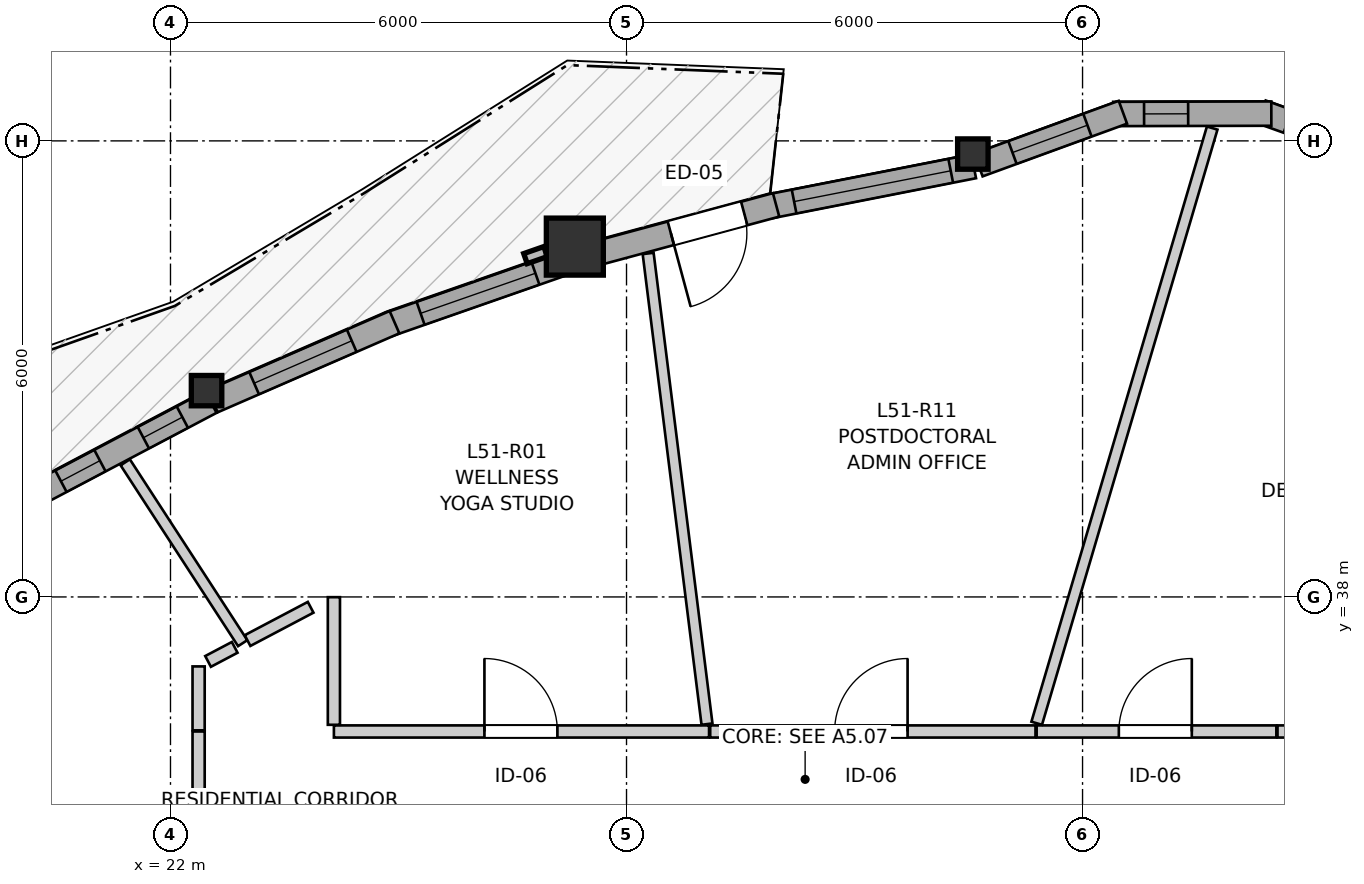
"""IFC4 building model, lengths in metres.
Left out: names, types, materials, properties, quantities, classifications, styles, units other than length and angle.
Written with IfcOpenShell. Run it as: python <this file> out.ifc"""

import sys

from ifc_helpers import new_model, si_unit, direction, frame, frame_2d, origin, origin_2d, place, context, subcontext, project, spatial, rectangle, i_section, extrude, source, transform, mapped, element, fill, save


model = new_model("IFC4")
c1 = context("Model", 3, precision=1e-05, world=origin(), true_north=direction((0.0, 1.0)))
c2 = subcontext(c1, "Body", "Model", "MODEL_VIEW")
j1 = project(units=[si_unit("LENGTHUNIT", "METRE"), si_unit("PLANEANGLEUNIT", "RADIAN")], contexts=[c1])
p1 = place(None, origin())
s1 = spatial("IfcSite", under=j1, at=p1, CompositionType="ELEMENT")
p2 = place(p1, origin())
s2 = spatial("IfcBuilding", under=s1, at=p2, CompositionType="ELEMENT")
p3 = place(p2, frame((0.0, 0.0, 171.4)))
s3 = spatial("IfcBuildingStorey", under=s2, at=p3, CompositionType="ELEMENT", Elevation=171.4)
m1 = source(origin(), c2, "Body", "SweptSolid", [
    extrude(i_section(OverallWidth=0.401, OverallDepth=0.399, WebThickness=0.023, FlangeThickness=0.036, FilletRadius=0.015, at=origin_2d()), origin(), (0.0, 0.0, 1.0), 2.95),
])
p4 = place(p3, frame((32.557, 43.827, 0.0), z_axis=(0.0, 0.0, 1.0), x_axis=(1.0, 0.0, 0.0)))
e1 = element("IfcColumn", 1, at=p4, inside=s3, PredefinedType="PILASTER", context=c2, shape_type="MappedRepresentation", body=[
    mapped(m1, transform((0.0, 0.0, 0.0), x_axis=(1.0, 0.0, 0.0), y_axis=(0.0, 1.0, 0.0), z_axis=(0.0, 0.0, 1.0), scale=1.0)),
])
m2 = source(origin(), c2, "Body", "SweptSolid", [
    extrude(rectangle(XDim=0.75, YDim=0.75, at=origin_2d()), origin(), (0.0, 0.0, 1.0), 2.95),
])
p5 = place(p3, frame((27.32, 42.609, 0.0), z_axis=(0.0, 0.0, 1.0), x_axis=(1.0, 0.0, 0.0)))
e2 = element("IfcColumn", 2, at=p5, inside=s3, PredefinedType="COLUMN", context=c2, shape_type="MappedRepresentation", body=[
    mapped(m2, transform((0.0, 0.0, 0.0), x_axis=(1.0, 0.0, 0.0), y_axis=(0.0, 1.0, 0.0), z_axis=(0.0, 0.0, 1.0), scale=1.0)),
])
p6 = place(p3, frame((22.475, 40.714, 0.0), z_axis=(0.0, 0.0, 1.0), x_axis=(1.0, 0.0, 0.0)))
e3 = element("IfcColumn", 3, at=p6, inside=s3, PredefinedType="PILASTER", context=c2, shape_type="MappedRepresentation", body=[
    mapped(m1, transform((0.0, 0.0, 0.0), x_axis=(1.0, 0.0, 0.0), y_axis=(0.0, 1.0, 0.0), z_axis=(0.0, 0.0, 1.0), scale=1.0)),
])
p7 = place(p3, frame((38.314, 43.677, 0.0), z_axis=(0.0, 0.0, 1.0), x_axis=(-0.941071215914, 0.338208466153, 0.0)))
e4 = element("IfcWall", 4, at=p7, inside=s3, PredefinedType="SOLIDWALL", context=c2, shape_type="SweptSolid", body=[
    extrude(rectangle(XDim=2.081, YDim=0.32, at=frame_2d((1.041, 0.0))), origin(), (0.0, 0.0, 1.0), 2.53),
])
p8 = place(p7, frame((0.365, 0.0, 0.82)))
e5 = element("IfcOpeningElement", 5, at=p8, cuts=e4, PredefinedType="OPENING", context=c2, shape_type="SweptSolid", body=[
    extrude(rectangle(XDim=1.35, YDim=1.45, at=frame_2d((0.675, 0.725))), frame((0.0, 0.17, 0.0), z_axis=(0.0, -1.0, 0.0), x_axis=(1.0, 0.0, 0.0)), (0.0, 0.0, 1.0), 0.34),
])
p9 = place(p3, frame((36.484, 44.359, 0.0), z_axis=(0.0, 0.0, 1.0), x_axis=(-0.999997248057, -0.0023460346, 0.0)))
e6 = element("IfcWall", 6, at=p9, inside=s3, PredefinedType="SOLIDWALL", context=c2, shape_type="SweptSolid", body=[
    extrude(rectangle(XDim=2.081, YDim=0.32, at=frame_2d((1.041, 0.0))), origin(), (0.0, 0.0, 1.0), 2.53),
])
p10 = place(p9, frame((1.094, 0.0, 0.82)))
e7 = element("IfcOpeningElement", 7, at=p10, cuts=e6, PredefinedType="OPENING", context=c2, shape_type="SweptSolid", body=[
    extrude(rectangle(XDim=0.58, YDim=1.35, at=frame_2d((0.29, 0.675))), frame((0.0, 0.17, 0.0), z_axis=(0.0, -1.0, 0.0), x_axis=(1.0, 0.0, 0.0)), (0.0, 0.0, 1.0), 0.34),
])
p11 = place(p3, frame((34.531, 44.377, 0.0), z_axis=(0.0, 0.0, 1.0), x_axis=(-0.939387553708, -0.342857148007, 0.0)))
e8 = element("IfcWall", 8, at=p11, inside=s3, PredefinedType="SOLIDWALL", context=c2, shape_type="SweptSolid", body=[
    extrude(rectangle(XDim=2.023, YDim=0.32, at=frame_2d((1.011, 0.0))), origin(), (0.0, 0.0, 1.0), 2.53),
])
p12 = place(p11, frame((0.497, 0.0, 0.82)))
e9 = element("IfcOpeningElement", 9, at=p12, cuts=e8, PredefinedType="OPENING", context=c2, shape_type="SweptSolid", body=[
    extrude(rectangle(XDim=1.05, YDim=1.45, at=frame_2d((0.525, 0.725))), frame((0.0, 0.17, 0.0), z_axis=(0.0, -1.0, 0.0), x_axis=(1.0, 0.0, 0.0)), (0.0, 0.0, 1.0), 0.34),
])
p13 = place(p3, frame((32.568, 43.666, 0.0), z_axis=(0.0, 0.0, 1.0), x_axis=(-0.98123405142, -0.192820476959, 0.0)))
e10 = element("IfcWall", 10, at=p13, inside=s3, PredefinedType="SOLIDWALL", context=c2, shape_type="SweptSolid", body=[
    extrude(rectangle(XDim=2.736, YDim=0.32, at=frame_2d((1.368, 0.0))), origin(), (0.0, 0.0, 1.0), 2.53),
])
p14 = place(p13, frame((0.308, 0.0, 0.82)))
e11 = element("IfcOpeningElement", 11, at=p14, cuts=e10, PredefinedType="OPENING", context=c2, shape_type="SweptSolid", body=[
    extrude(rectangle(XDim=2.1, YDim=1.4, at=frame_2d((1.05, 0.7))), frame((0.0, 0.17, 0.0), z_axis=(0.0, -1.0, 0.0), x_axis=(1.0, 0.0, 0.0)), (0.0, 0.0, 1.0), 0.34),
])
p15 = place(p3, frame((29.968, 43.158, 0.0), z_axis=(0.0, 0.0, 1.0), x_axis=(-0.965458407369, -0.260557217593, 0.0)))
e12 = element("IfcWall", 12, at=p15, inside=s3, PredefinedType="SOLIDWALL", context=c2, shape_type="SweptSolid", body=[
    extrude(rectangle(XDim=2.535, YDim=0.32, at=frame_2d((1.267, 0.0))), origin(), (0.0, 0.0, 1.0), 2.53),
])
p16 = place(p15, frame((0.434, 0.0, 0.0)))
e13 = element("IfcOpeningElement", 13, at=p16, cuts=e12, PredefinedType="OPENING", context=c2, shape_type="SweptSolid", body=[
    extrude(rectangle(XDim=1.0, YDim=2.1, at=frame_2d((0.5, 1.05))), frame((0.0, 0.17, 0.0), z_axis=(0.0, -1.0, 0.0), x_axis=(1.0, 0.0, 0.0)), (0.0, 0.0, 1.0), 0.34),
])
p17 = place(p3, frame((27.217, 42.404, 0.0), z_axis=(0.0, 0.0, 1.0), x_axis=(-0.94410869631, -0.329634296687, 0.0)))
e14 = element("IfcWall", 14, at=p17, inside=s3, PredefinedType="SOLIDWALL", context=c2, shape_type="SweptSolid", body=[
    extrude(rectangle(XDim=2.491, YDim=0.32, at=frame_2d((1.245, 0.0))), origin(), (0.0, 0.0, 1.0), 2.53),
])
p18 = place(p17, frame((0.44, 0.0, 0.82)))
e15 = element("IfcOpeningElement", 15, at=p18, cuts=e14, PredefinedType="OPENING", context=c2, shape_type="SweptSolid", body=[
    extrude(rectangle(XDim=1.6, YDim=1.35, at=frame_2d((0.8, 0.675))), frame((0.0, 0.17, 0.0), z_axis=(0.0, -1.0, 0.0), x_axis=(1.0, 0.0, 0.0)), (0.0, 0.0, 1.0), 0.34),
])
p19 = place(p3, frame((24.947, 41.615, 0.0), z_axis=(0.0, 0.0, 1.0), x_axis=(-0.9171028146, -0.398650758752, 0.0)))
e16 = element("IfcWall", 16, at=p19, inside=s3, PredefinedType="SOLIDWALL", context=c2, shape_type="SweptSolid", body=[
    extrude(rectangle(XDim=2.606, YDim=0.32, at=frame_2d((1.303, 0.0))), origin(), (0.0, 0.0, 1.0), 2.53),
])
p20 = place(p19, frame((0.613, 0.0, 0.82)))
e17 = element("IfcOpeningElement", 17, at=p20, cuts=e16, PredefinedType="OPENING", context=c2, shape_type="SweptSolid", body=[
    extrude(rectangle(XDim=1.4, YDim=1.35, at=frame_2d((0.7, 0.675))), frame((0.0, 0.17, 0.0), z_axis=(0.0, -1.0, 0.0), x_axis=(1.0, 0.0, 0.0)), (0.0, 0.0, 1.0), 0.34),
])
p21 = place(p3, frame((22.531, 40.563, 0.0), z_axis=(0.0, 0.0, 1.0), x_axis=(-0.884376111278, -0.466774992691, 0.0)))
e18 = element("IfcWall", 18, at=p21, inside=s3, PredefinedType="SOLIDWALL", context=c2, shape_type="SweptSolid", body=[
    extrude(rectangle(XDim=2.592, YDim=0.32, at=frame_2d((1.296, 0.0))), origin(), (0.0, 0.0, 1.0), 2.53),
])
p22 = place(p21, frame((0.424, 0.0, 0.82)))
e19 = element("IfcOpeningElement", 19, at=p22, cuts=e18, PredefinedType="OPENING", context=c2, shape_type="SweptSolid", body=[
    extrude(rectangle(XDim=0.58, YDim=1.35, at=frame_2d((0.29, 0.675))), frame((0.0, 0.17, 0.0), z_axis=(0.0, -1.0, 0.0), x_axis=(1.0, 0.0, 0.0)), (0.0, 0.0, 1.0), 0.34),
])
p23 = place(p21, frame((1.65, 0.0, 0.82)))
e20 = element("IfcOpeningElement", 20, at=p23, cuts=e18, PredefinedType="OPENING", context=c2, shape_type="SweptSolid", body=[
    extrude(rectangle(XDim=0.58, YDim=1.35, at=frame_2d((0.29, 0.675))), frame((0.0, 0.17, 0.0), z_axis=(0.0, -1.0, 0.0), x_axis=(1.0, 0.0, 0.0)), (0.0, 0.0, 1.0), 0.34),
])
p24 = place(p3, frame((24.15, 36.23, 0.0), z_axis=(0.0, 0.0, 1.0), x_axis=(1.0, 0.0, 0.0)))
e21 = element("IfcWall", 21, at=p24, inside=s3, PredefinedType="PARTITIONING", context=c2, shape_type="SweptSolid", body=[
    extrude(rectangle(XDim=4.936, YDim=0.16, at=frame_2d((2.468, 0.0))), origin(), (0.0, 0.0, 1.0), 2.95),
])
p25 = place(p24, frame((1.98, 0.0, 0.0)))
e22 = element("IfcOpeningElement", 22, at=p25, cuts=e21, PredefinedType="OPENING", context=c2, shape_type="SweptSolid", body=[
    extrude(rectangle(XDim=0.96, YDim=2.1, at=frame_2d((0.48, 1.05))), frame((0.0, 0.09, 0.0), z_axis=(0.0, -1.0, 0.0), x_axis=(1.0, 0.0, 0.0)), (0.0, 0.0, 1.0), 0.18),
])
p26 = place(p3, frame((29.101, 36.23, 0.0), z_axis=(0.0, 0.0, 1.0), x_axis=(1.0, 0.0, 0.0)))
e23 = element("IfcWall", 23, at=p26, inside=s3, PredefinedType="PARTITIONING", context=c2, shape_type="SweptSolid", body=[
    extrude(rectangle(XDim=4.28, YDim=0.16, at=frame_2d((2.14, 0.0))), origin(), (0.0, 0.0, 1.0), 2.588),
])
p27 = place(p26, frame((1.637, 0.0, 0.0)))
e24 = element("IfcOpeningElement", 24, at=p27, cuts=e23, PredefinedType="OPENING", context=c2, shape_type="SweptSolid", body=[
    extrude(rectangle(XDim=0.96, YDim=2.1, at=frame_2d((0.48, 1.05))), frame((0.0, 0.09, 0.0), z_axis=(0.0, -1.0, 0.0), x_axis=(1.0, 0.0, 0.0)), (0.0, 0.0, 1.0), 0.18),
])
p28 = place(p3, frame((33.396, 36.23, 0.0), z_axis=(0.0, 0.0, 1.0), x_axis=(1.0, 0.0, 0.0)))
e25 = element("IfcWall", 25, at=p28, inside=s3, PredefinedType="PARTITIONING", context=c2, shape_type="SweptSolid", body=[
    extrude(rectangle(XDim=3.154, YDim=0.16, at=frame_2d((1.577, 0.0))), origin(), (0.0, 0.0, 1.0), 2.588),
])
p29 = place(p28, frame((1.082, 0.0, 0.0)))
e26 = element("IfcOpeningElement", 26, at=p29, cuts=e25, PredefinedType="OPENING", context=c2, shape_type="SweptSolid", body=[
    extrude(rectangle(XDim=0.96, YDim=2.1, at=frame_2d((0.48, 1.05))), frame((0.0, 0.09, 0.0), z_axis=(0.0, -1.0, 0.0), x_axis=(1.0, 0.0, 0.0)), (0.0, 0.0, 1.0), 0.18),
])
p30 = place(p3, frame((33.397, 36.338, 0.0), z_axis=(0.0, 0.0, 1.0), x_axis=(0.282812266721, 0.9591752821, 0.0)))
e27 = element("IfcWall", 27, at=p30, inside=s3, PredefinedType="PARTITIONING", context=c2, shape_type="SweptSolid", body=[
    extrude(rectangle(XDim=8.164, YDim=0.145, at=frame_2d((4.082, 0.0))), origin(), (0.0, 0.0, 1.0), 2.95),
])
p31 = place(p3, frame((28.284, 42.519, 0.0), z_axis=(0.0, 0.0, 1.0), x_axis=(0.124092513413, -0.992270652652, 0.0)))
e28 = element("IfcWall", 28, at=p31, inside=s3, PredefinedType="PARTITIONING", context=c2, shape_type="SweptSolid", body=[
    extrude(rectangle(XDim=6.241, YDim=0.145, at=frame_2d((3.12, 0.0))), origin(), (0.0, 0.0, 1.0), 2.95),
])
p32 = place(p3, frame((21.405, 39.771, 0.0), z_axis=(0.0, 0.0, 1.0), x_axis=(0.544731217197, -0.838610696933, 0.0)))
e29 = element("IfcWall", 29, at=p32, inside=s3, PredefinedType="PARTITIONING", context=c2, shape_type="SweptSolid", body=[
    extrude(rectangle(XDim=2.837, YDim=0.145, at=frame_2d((1.418, 0.0))), origin(), (0.0, 0.0, 1.0), 2.95),
])
p33 = place(p3, frame((24.15, 36.318, 0.0), z_axis=(0.0, 0.0, 1.0), x_axis=(0.0, 1.0, 0.0)))
e30 = element("IfcWall", 30, at=p33, inside=s3, PredefinedType="PARTITIONING", context=c2, shape_type="SweptSolid", body=[
    extrude(rectangle(XDim=1.679, YDim=0.16, at=frame_2d((0.839, 0.0))), origin(), (0.0, 0.0, 1.0), 2.95),
])
p34 = place(p3, frame((36.565, 36.23, 0.0), z_axis=(0.0, 0.0, 1.0), x_axis=(1.0, 0.0, 0.0)))
e31 = element("IfcWall", 31, at=p34, inside=s3, PredefinedType="PARTITIONING", context=c2, shape_type="SweptSolid", body=[
    extrude(rectangle(XDim=1.677, YDim=0.16, at=frame_2d((0.838, 0.0))), origin(), (0.0, 0.0, 1.0), 2.95),
])
p35 = place(p3, frame((22.37, 34.465, 0.0), z_axis=(0.0, 0.0, 1.0), x_axis=(0.0, 1.0, 0.0)))
e32 = element("IfcWall", 32, at=p35, inside=s3, PredefinedType="PARTITIONING", context=c2, shape_type="SweptSolid", body=[
    extrude(rectangle(XDim=1.765, YDim=0.16, at=frame_2d((0.882, 0.0))), origin(), (0.0, 0.0, 1.0), 2.95),
])
p36 = place(p3, frame((23.014, 37.426, 0.0), z_axis=(0.0, 0.0, 1.0), x_axis=(0.884432472224, 0.466668192697, 0.0)))
e33 = element("IfcWall", 33, at=p36, inside=s3, PredefinedType="PARTITIONING", context=c2, shape_type="SweptSolid", body=[
    extrude(rectangle(XDim=0.938, YDim=0.16, at=frame_2d((0.469, 0.0))), origin(), (0.0, 0.0, 1.0), 2.558),
])
p37 = place(p3, frame((22.37, 36.245, 0.0), z_axis=(0.0, 0.0, 1.0), x_axis=(0.0, 1.0, 0.0)))
e34 = element("IfcWall", 34, at=p37, inside=s3, PredefinedType="PARTITIONING", context=c2, shape_type="SweptSolid", body=[
    extrude(rectangle(XDim=0.841, YDim=0.16, at=frame_2d((0.42, 0.0))), origin(), (0.0, 0.0, 1.0), 2.95),
])
p38 = place(p3, frame((22.494, 37.152, 0.0), z_axis=(0.0, 0.0, 1.0), x_axis=(0.884356504768, 0.466812138311, 0.0)))
e35 = element("IfcWall", 35, at=p38, inside=s3, PredefinedType="PARTITIONING", context=c2, shape_type="SweptSolid", body=[
    extrude(rectangle(XDim=0.396, YDim=0.16, at=frame_2d((0.198, 0.0))), origin(), (0.0, 0.0, 1.0), 2.558),
])
m3 = source(origin(), c2, "Body", "SweptSolid", [
    extrude(rectangle(XDim=0.58, YDim=1.35, at=frame_2d((0.29, 0.675))), frame((0.0, 0.03, 0.0), z_axis=(0.0, -1.0, 0.0), x_axis=(1.0, 0.0, 0.0)), (0.0, 0.0, 1.0), 0.06),
])
p39 = place(p10, origin())
e36 = element("IfcWindow", 36, at=p39, inside=s3, PartitioningType="SINGLE_PANEL", PredefinedType="WINDOW", context=c2, shape_type="MappedRepresentation", body=[
    mapped(m3, transform((0.0, 0.0, 0.0), x_axis=(1.0, 0.0, 0.0), y_axis=(0.0, 1.0, 0.0), z_axis=(0.0, 0.0, 1.0), scale=1.0)),
])
fill(e7, e36)
m4 = source(origin(), c2, "Body", "SweptSolid", [
    extrude(rectangle(XDim=1.05, YDim=1.45, at=frame_2d((0.525, 0.725))), frame((0.0, 0.03, 0.0), z_axis=(0.0, -1.0, 0.0), x_axis=(1.0, 0.0, 0.0)), (0.0, 0.0, 1.0), 0.06),
])
p40 = place(p12, origin())
e37 = element("IfcWindow", 37, at=p40, inside=s3, PartitioningType="SINGLE_PANEL", PredefinedType="WINDOW", context=c2, shape_type="MappedRepresentation", body=[
    mapped(m4, transform((0.0, 0.0, 0.0), x_axis=(1.0, 0.0, 0.0), y_axis=(0.0, 1.0, 0.0), z_axis=(0.0, 0.0, 1.0), scale=1.0)),
])
fill(e9, e37)
m5 = source(origin(), c2, "Body", "SweptSolid", [
    extrude(rectangle(XDim=2.1, YDim=1.4, at=frame_2d((1.05, 0.7))), frame((0.0, 0.03, 0.0), z_axis=(0.0, -1.0, 0.0), x_axis=(1.0, 0.0, 0.0)), (0.0, 0.0, 1.0), 0.06),
])
p41 = place(p14, origin())
e38 = element("IfcWindow", 38, at=p41, inside=s3, PartitioningType="SINGLE_PANEL", PredefinedType="WINDOW", context=c2, shape_type="MappedRepresentation", body=[
    mapped(m5, transform((0.0, 0.0, 0.0), x_axis=(1.0, 0.0, 0.0), y_axis=(0.0, 1.0, 0.0), z_axis=(0.0, 0.0, 1.0), scale=1.0)),
])
fill(e11, e38)
m6 = source(origin(), c2, "Body", "SweptSolid", [
    extrude(rectangle(XDim=1.0, YDim=2.1, at=frame_2d((0.5, 1.05))), frame((0.0, 0.025, 0.0), z_axis=(0.0, -1.0, 0.0), x_axis=(1.0, 0.0, 0.0)), (0.0, 0.0, 1.0), 0.05),
])
p42 = place(p16, origin())
e39 = element("IfcDoor", 39, at=p42, inside=s3, OperationType="SINGLE_SWING_RIGHT", PredefinedType="DOOR", context=c2, shape_type="MappedRepresentation", body=[
    mapped(m6, transform((0.0, 0.0, 0.0), x_axis=(1.0, 0.0, 0.0), y_axis=(0.0, 1.0, 0.0), z_axis=(0.0, 0.0, 1.0), scale=1.0)),
])
fill(e13, e39)
m7 = source(origin(), c2, "Body", "SweptSolid", [
    extrude(rectangle(XDim=1.6, YDim=1.35, at=frame_2d((0.8, 0.675))), frame((0.0, 0.03, 0.0), z_axis=(0.0, -1.0, 0.0), x_axis=(1.0, 0.0, 0.0)), (0.0, 0.0, 1.0), 0.06),
])
p43 = place(p18, origin())
e40 = element("IfcWindow", 40, at=p43, inside=s3, PartitioningType="SINGLE_PANEL", PredefinedType="WINDOW", context=c2, shape_type="MappedRepresentation", body=[
    mapped(m7, transform((0.0, 0.0, 0.0), x_axis=(1.0, 0.0, 0.0), y_axis=(0.0, 1.0, 0.0), z_axis=(0.0, 0.0, 1.0), scale=1.0)),
])
fill(e15, e40)
m8 = source(origin(), c2, "Body", "SweptSolid", [
    extrude(rectangle(XDim=1.4, YDim=1.35, at=frame_2d((0.7, 0.675))), frame((0.0, 0.03, 0.0), z_axis=(0.0, -1.0, 0.0), x_axis=(1.0, 0.0, 0.0)), (0.0, 0.0, 1.0), 0.06),
])
p44 = place(p20, origin())
e41 = element("IfcWindow", 41, at=p44, inside=s3, PartitioningType="SINGLE_PANEL", PredefinedType="WINDOW", context=c2, shape_type="MappedRepresentation", body=[
    mapped(m8, transform((0.0, 0.0, 0.0), x_axis=(1.0, 0.0, 0.0), y_axis=(0.0, 1.0, 0.0), z_axis=(0.0, 0.0, 1.0), scale=1.0)),
])
fill(e17, e41)
p45 = place(p22, origin())
e42 = element("IfcWindow", 42, at=p45, inside=s3, PartitioningType="SINGLE_PANEL", PredefinedType="WINDOW", context=c2, shape_type="MappedRepresentation", body=[
    mapped(m3, transform((0.0, 0.0, 0.0), x_axis=(1.0, 0.0, 0.0), y_axis=(0.0, 1.0, 0.0), z_axis=(0.0, 0.0, 1.0), scale=1.0)),
])
fill(e19, e42)
p46 = place(p23, origin())
e43 = element("IfcWindow", 43, at=p46, inside=s3, PartitioningType="SINGLE_PANEL", PredefinedType="WINDOW", context=c2, shape_type="MappedRepresentation", body=[
    mapped(m3, transform((0.0, 0.0, 0.0), x_axis=(1.0, 0.0, 0.0), y_axis=(0.0, 1.0, 0.0), z_axis=(0.0, 0.0, 1.0), scale=1.0)),
])
fill(e20, e43)
m9 = source(origin(), c2, "Body", "SweptSolid", [
    extrude(rectangle(XDim=0.96, YDim=2.1, at=frame_2d((0.48, 1.05))), frame((0.0, 0.025, 0.0), z_axis=(0.0, -1.0, 0.0), x_axis=(1.0, 0.0, 0.0)), (0.0, 0.0, 1.0), 0.05),
])
p47 = place(p25, origin())
e44 = element("IfcDoor", 44, at=p47, inside=s3, OperationType="SINGLE_SWING_LEFT", PredefinedType="DOOR", context=c2, shape_type="MappedRepresentation", body=[
    mapped(m9, transform((0.0, 0.0, 0.0), x_axis=(1.0, 0.0, 0.0), y_axis=(0.0, 1.0, 0.0), z_axis=(0.0, 0.0, 1.0), scale=1.0)),
])
fill(e22, e44)
p48 = place(p27, origin())
e45 = element("IfcDoor", 45, at=p48, inside=s3, OperationType="SINGLE_SWING_RIGHT", PredefinedType="DOOR", context=c2, shape_type="MappedRepresentation", body=[
    mapped(m9, transform((0.0, 0.0, 0.0), x_axis=(1.0, 0.0, 0.0), y_axis=(0.0, 1.0, 0.0), z_axis=(0.0, 0.0, 1.0), scale=1.0)),
])
fill(e24, e45)
p49 = place(p29, origin())
e46 = element("IfcDoor", 46, at=p49, inside=s3, OperationType="SINGLE_SWING_RIGHT", PredefinedType="DOOR", context=c2, shape_type="MappedRepresentation", body=[
    mapped(m9, transform((0.0, 0.0, 0.0), x_axis=(1.0, 0.0, 0.0), y_axis=(0.0, 1.0, 0.0), z_axis=(0.0, 0.0, 1.0), scale=1.0)),
])
fill(e26, e46)
save(model, sys.argv[1])
